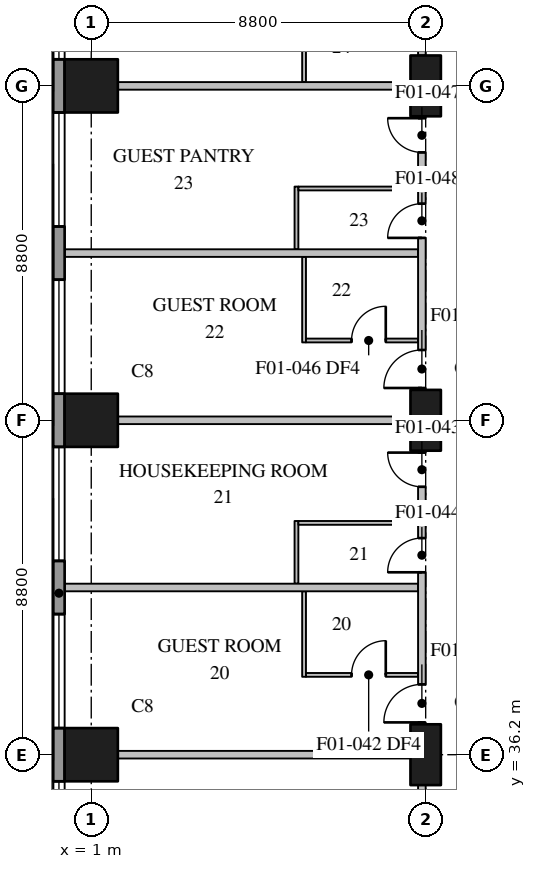
"""IFC4 building model, lengths in metres.
Left out: names, types, materials, properties, quantities, classifications, styles, units other than length and angle.
Written with IfcOpenShell. Run it as: python <this file> out.ifc"""

import sys

from ifc_helpers import new_model, si_unit, direction, frame, frame_2d, origin, origin_2d, place, context, subcontext, project, spatial, rectangle, extrude, element, fill, save


model = new_model("IFC4")
c1 = context("Model", 3, precision=1e-05, world=origin(), true_north=direction((0.0, 1.0)))
c2 = subcontext(c1, "Body", "Model", "MODEL_VIEW")
j1 = project(units=[si_unit("LENGTHUNIT", "METRE"), si_unit("PLANEANGLEUNIT", "RADIAN")], contexts=[c1])
p1 = place(None, origin())
s1 = spatial("IfcSite", under=j1, at=p1, CompositionType="ELEMENT")
p2 = place(p1, origin())
s2 = spatial("IfcBuilding", under=s1, at=p2, CompositionType="ELEMENT")
p3 = place(p2, frame((0.0, 0.0, 34.0)))
s3 = spatial("IfcBuildingStorey", under=s2, at=p3, CompositionType="ELEMENT", Elevation=34.0)
for number, where, z_axis, x_axis in (
    (1, (1.0, 36.2, 0.0), (0.0, 0.0, 1.0), (1.0, 0.0, 0.0)),
    (2, (1.0, 45.0, 0.0), (0.0, 0.0, 1.0), (1.0, 0.0, 0.0)),
    (3, (1.0, 53.8, 0.0), (0.0, 0.0, 1.0), (1.0, 0.0, 0.0)),
):
    element("IfcColumn", number, at=place(p3, frame(where, z_axis=z_axis, x_axis=x_axis)), inside=s3, PredefinedType="COLUMN", context=c2, shape_type="SweptSolid", body=[
        extrude(rectangle(XDim=1.4, YDim=1.4, at=origin_2d()), origin(), (0.0, 0.0, 1.0), 3.7),
    ])
for number, where, z_axis, x_axis in (
    (4, (9.8, 36.2, 0.0), (0.0, 0.0, 1.0), (0.0, 1.0, 0.0)),
    (5, (9.8, 45.0, 0.0), (0.0, 0.0, 1.0), (0.0, 1.0, 0.0)),
    (6, (9.8, 53.8, 0.0), (0.0, 0.0, 1.0), (0.0, 1.0, 0.0)),
):
    element("IfcColumn", number, at=place(p3, frame(where, z_axis=z_axis, x_axis=x_axis)), inside=s3, PredefinedType="COLUMN", context=c2, shape_type="SweptSolid", body=[
        extrude(rectangle(XDim=1.6, YDim=0.8, at=origin_2d()), origin(), (0.0, 0.0, 1.0), 3.7),
    ])
p4 = place(p3, frame((0.15, 78.7, 0.0), z_axis=(0.0, 0.0, 1.0), x_axis=(0.0, -1.0, 0.0)))
e7 = element("IfcWall", 7, at=p4, inside=s3, PredefinedType="STANDARD", context=c2, shape_type="SweptSolid", body=[
    extrude(rectangle(XDim=76.5, YDim=0.3, at=frame_2d((38.25, 0.0))), origin(), (0.0, 0.0, 1.0), 3.4),
])
p5 = place(p4, frame((3.6, 0.0, 0.75)))
e8 = element("IfcOpeningElement", 8, at=p5, cuts=e7, PredefinedType="OPENING", context=c2, shape_type="SweptSolid", body=[
    extrude(rectangle(XDim=3.0, YDim=2.3, at=frame_2d((1.5, 1.15))), frame((0.0, 0.16, 0.0), z_axis=(0.0, -1.0, 0.0), x_axis=(1.0, 0.0, 0.0)), (0.0, 0.0, 1.0), 0.32),
])
p6 = place(p4, frame((8.0, 0.0, 0.75)))
e9 = element("IfcOpeningElement", 9, at=p6, cuts=e7, PredefinedType="OPENING", context=c2, shape_type="SweptSolid", body=[
    extrude(rectangle(XDim=3.0, YDim=2.3, at=frame_2d((1.5, 1.15))), frame((0.0, 0.16, 0.0), z_axis=(0.0, -1.0, 0.0), x_axis=(1.0, 0.0, 0.0)), (0.0, 0.0, 1.0), 0.32),
])
p7 = place(p4, frame((12.4, 0.0, 0.75)))
e10 = element("IfcOpeningElement", 10, at=p7, cuts=e7, PredefinedType="OPENING", context=c2, shape_type="SweptSolid", body=[
    extrude(rectangle(XDim=3.0, YDim=2.3, at=frame_2d((1.5, 1.15))), frame((0.0, 0.16, 0.0), z_axis=(0.0, -1.0, 0.0), x_axis=(1.0, 0.0, 0.0)), (0.0, 0.0, 1.0), 0.32),
])
p8 = place(p4, frame((16.8, 0.0, 0.75)))
e11 = element("IfcOpeningElement", 11, at=p8, cuts=e7, PredefinedType="OPENING", context=c2, shape_type="SweptSolid", body=[
    extrude(rectangle(XDim=3.0, YDim=2.3, at=frame_2d((1.5, 1.15))), frame((0.0, 0.16, 0.0), z_axis=(0.0, -1.0, 0.0), x_axis=(1.0, 0.0, 0.0)), (0.0, 0.0, 1.0), 0.32),
])
p9 = place(p4, frame((21.2, 0.0, 0.75)))
e12 = element("IfcOpeningElement", 12, at=p9, cuts=e7, PredefinedType="OPENING", context=c2, shape_type="SweptSolid", body=[
    extrude(rectangle(XDim=3.0, YDim=2.3, at=frame_2d((1.5, 1.15))), frame((0.0, 0.16, 0.0), z_axis=(0.0, -1.0, 0.0), x_axis=(1.0, 0.0, 0.0)), (0.0, 0.0, 1.0), 0.32),
])
p10 = place(p4, frame((25.6, 0.0, 0.75)))
e13 = element("IfcOpeningElement", 13, at=p10, cuts=e7, PredefinedType="OPENING", context=c2, shape_type="SweptSolid", body=[
    extrude(rectangle(XDim=3.0, YDim=2.3, at=frame_2d((1.5, 1.15))), frame((0.0, 0.16, 0.0), z_axis=(0.0, -1.0, 0.0), x_axis=(1.0, 0.0, 0.0)), (0.0, 0.0, 1.0), 0.32),
])
p11 = place(p4, frame((30.0, 0.0, 0.75)))
e14 = element("IfcOpeningElement", 14, at=p11, cuts=e7, PredefinedType="OPENING", context=c2, shape_type="SweptSolid", body=[
    extrude(rectangle(XDim=3.0, YDim=2.3, at=frame_2d((1.5, 1.15))), frame((0.0, 0.16, 0.0), z_axis=(0.0, -1.0, 0.0), x_axis=(1.0, 0.0, 0.0)), (0.0, 0.0, 1.0), 0.32),
])
p12 = place(p4, frame((34.4, 0.0, 0.75)))
e15 = element("IfcOpeningElement", 15, at=p12, cuts=e7, PredefinedType="OPENING", context=c2, shape_type="SweptSolid", body=[
    extrude(rectangle(XDim=3.0, YDim=2.3, at=frame_2d((1.5, 1.15))), frame((0.0, 0.16, 0.0), z_axis=(0.0, -1.0, 0.0), x_axis=(1.0, 0.0, 0.0)), (0.0, 0.0, 1.0), 0.32),
])
p13 = place(p4, frame((38.8, 0.0, 0.75)))
e16 = element("IfcOpeningElement", 16, at=p13, cuts=e7, PredefinedType="OPENING", context=c2, shape_type="SweptSolid", body=[
    extrude(rectangle(XDim=3.0, YDim=2.3, at=frame_2d((1.5, 1.15))), frame((0.0, 0.16, 0.0), z_axis=(0.0, -1.0, 0.0), x_axis=(1.0, 0.0, 0.0)), (0.0, 0.0, 1.0), 0.32),
])
p14 = place(p4, frame((43.2, 0.0, 0.75)))
e17 = element("IfcOpeningElement", 17, at=p14, cuts=e7, PredefinedType="OPENING", context=c2, shape_type="SweptSolid", body=[
    extrude(rectangle(XDim=3.0, YDim=2.3, at=frame_2d((1.5, 1.15))), frame((0.0, 0.16, 0.0), z_axis=(0.0, -1.0, 0.0), x_axis=(1.0, 0.0, 0.0)), (0.0, 0.0, 1.0), 0.32),
])
p15 = place(p4, frame((47.6, 0.0, 0.75)))
e18 = element("IfcOpeningElement", 18, at=p15, cuts=e7, PredefinedType="OPENING", context=c2, shape_type="SweptSolid", body=[
    extrude(rectangle(XDim=3.0, YDim=2.3, at=frame_2d((1.5, 1.15))), frame((0.0, 0.16, 0.0), z_axis=(0.0, -1.0, 0.0), x_axis=(1.0, 0.0, 0.0)), (0.0, 0.0, 1.0), 0.32),
])
p16 = place(p4, frame((52.0, 0.0, 0.75)))
e19 = element("IfcOpeningElement", 19, at=p16, cuts=e7, PredefinedType="OPENING", context=c2, shape_type="SweptSolid", body=[
    extrude(rectangle(XDim=3.0, YDim=2.3, at=frame_2d((1.5, 1.15))), frame((0.0, 0.16, 0.0), z_axis=(0.0, -1.0, 0.0), x_axis=(1.0, 0.0, 0.0)), (0.0, 0.0, 1.0), 0.32),
])
p17 = place(p4, frame((56.4, 0.0, 0.75)))
e20 = element("IfcOpeningElement", 20, at=p17, cuts=e7, PredefinedType="OPENING", context=c2, shape_type="SweptSolid", body=[
    extrude(rectangle(XDim=3.0, YDim=2.3, at=frame_2d((1.5, 1.15))), frame((0.0, 0.16, 0.0), z_axis=(0.0, -1.0, 0.0), x_axis=(1.0, 0.0, 0.0)), (0.0, 0.0, 1.0), 0.32),
])
p18 = place(p4, frame((60.8, 0.0, 0.75)))
e21 = element("IfcOpeningElement", 21, at=p18, cuts=e7, PredefinedType="OPENING", context=c2, shape_type="SweptSolid", body=[
    extrude(rectangle(XDim=3.0, YDim=2.3, at=frame_2d((1.5, 1.15))), frame((0.0, 0.16, 0.0), z_axis=(0.0, -1.0, 0.0), x_axis=(1.0, 0.0, 0.0)), (0.0, 0.0, 1.0), 0.32),
])
p19 = place(p4, frame((65.2, 0.0, 0.75)))
e22 = element("IfcOpeningElement", 22, at=p19, cuts=e7, PredefinedType="OPENING", context=c2, shape_type="SweptSolid", body=[
    extrude(rectangle(XDim=3.0, YDim=2.3, at=frame_2d((1.5, 1.15))), frame((0.0, 0.16, 0.0), z_axis=(0.0, -1.0, 0.0), x_axis=(1.0, 0.0, 0.0)), (0.0, 0.0, 1.0), 0.32),
])
p20 = place(p4, frame((69.6, 0.0, 0.75)))
e23 = element("IfcOpeningElement", 23, at=p20, cuts=e7, PredefinedType="OPENING", context=c2, shape_type="SweptSolid", body=[
    extrude(rectangle(XDim=3.0, YDim=2.3, at=frame_2d((1.5, 1.15))), frame((0.0, 0.16, 0.0), z_axis=(0.0, -1.0, 0.0), x_axis=(1.0, 0.0, 0.0)), (0.0, 0.0, 1.0), 0.32),
])
p21 = place(p3, frame((9.7, 28.2, 0.0), z_axis=(0.0, 0.0, 1.0), x_axis=(0.0, 1.0, 0.0)))
e24 = element("IfcWall", 24, at=p21, inside=s3, PredefinedType="PARTITIONING", context=c2, shape_type="SweptSolid", body=[
    extrude(rectangle(XDim=7.2, YDim=0.2, at=frame_2d((3.6, 0.0))), origin(), (0.0, 0.0, 1.0), 3.4),
])
p22 = place(p21, frame((3.05, 0.0, 0.0)))
e25 = element("IfcOpeningElement", 25, at=p22, cuts=e24, PredefinedType="OPENING", context=c2, shape_type="SweptSolid", body=[
    extrude(rectangle(XDim=1.1, YDim=2.1, at=frame_2d((0.55, 1.05))), frame((0.0, 0.11, 0.0), z_axis=(0.0, -1.0, 0.0), x_axis=(1.0, 0.0, 0.0)), (0.0, 0.0, 1.0), 0.22),
])
p23 = place(p3, frame((9.7, 37.0, 0.0), z_axis=(0.0, 0.0, 1.0), x_axis=(0.0, 1.0, 0.0)))
e26 = element("IfcWall", 26, at=p23, inside=s3, PredefinedType="PARTITIONING", context=c2, shape_type="SweptSolid", body=[
    extrude(rectangle(XDim=7.2, YDim=0.2, at=frame_2d((3.6, 0.0))), origin(), (0.0, 0.0, 1.0), 3.4),
])
p24 = place(p23, frame((0.05, 0.0, 0.0)))
e27 = element("IfcOpeningElement", 27, at=p24, cuts=e26, PredefinedType="OPENING", context=c2, shape_type="SweptSolid", body=[
    extrude(rectangle(XDim=1.0, YDim=2.1, at=frame_2d((0.5, 1.05))), frame((0.0, 0.11, 0.0), z_axis=(0.0, -1.0, 0.0), x_axis=(1.0, 0.0, 0.0)), (0.0, 0.0, 1.0), 0.22),
])
p25 = place(p23, frame((6.25, 0.0, 0.0)))
e28 = element("IfcOpeningElement", 28, at=p25, cuts=e26, PredefinedType="OPENING", context=c2, shape_type="SweptSolid", body=[
    extrude(rectangle(XDim=0.9, YDim=2.1, at=frame_2d((0.45, 1.05))), frame((0.0, 0.11, 0.0), z_axis=(0.0, -1.0, 0.0), x_axis=(1.0, 0.0, 0.0)), (0.0, 0.0, 1.0), 0.22),
])
p26 = place(p23, frame((4.0, 0.0, 0.0)))
e29 = element("IfcOpeningElement", 29, at=p26, cuts=e26, PredefinedType="OPENING", context=c2, shape_type="SweptSolid", body=[
    extrude(rectangle(XDim=0.9, YDim=2.1, at=frame_2d((0.45, 1.05))), frame((0.0, 0.11, 0.0), z_axis=(0.0, -1.0, 0.0), x_axis=(1.0, 0.0, 0.0)), (0.0, 0.0, 1.0), 0.22),
])
p27 = place(p3, frame((9.7, 45.8, 0.0), z_axis=(0.0, 0.0, 1.0), x_axis=(0.0, 1.0, 0.0)))
e30 = element("IfcWall", 30, at=p27, inside=s3, PredefinedType="PARTITIONING", context=c2, shape_type="SweptSolid", body=[
    extrude(rectangle(XDim=7.2, YDim=0.2, at=frame_2d((3.6, 0.0))), origin(), (0.0, 0.0, 1.0), 3.4),
])
p28 = place(p27, frame((0.05, 0.0, 0.0)))
e31 = element("IfcOpeningElement", 31, at=p28, cuts=e30, PredefinedType="OPENING", context=c2, shape_type="SweptSolid", body=[
    extrude(rectangle(XDim=1.0, YDim=2.1, at=frame_2d((0.5, 1.05))), frame((0.0, 0.11, 0.0), z_axis=(0.0, -1.0, 0.0), x_axis=(1.0, 0.0, 0.0)), (0.0, 0.0, 1.0), 0.22),
])
p29 = place(p27, frame((6.25, 0.0, 0.0)))
e32 = element("IfcOpeningElement", 32, at=p29, cuts=e30, PredefinedType="OPENING", context=c2, shape_type="SweptSolid", body=[
    extrude(rectangle(XDim=0.9, YDim=2.1, at=frame_2d((0.45, 1.05))), frame((0.0, 0.11, 0.0), z_axis=(0.0, -1.0, 0.0), x_axis=(1.0, 0.0, 0.0)), (0.0, 0.0, 1.0), 0.22),
])
p30 = place(p27, frame((4.0, 0.0, 0.0)))
e33 = element("IfcOpeningElement", 33, at=p30, cuts=e30, PredefinedType="OPENING", context=c2, shape_type="SweptSolid", body=[
    extrude(rectangle(XDim=0.9, YDim=2.1, at=frame_2d((0.45, 1.05))), frame((0.0, 0.11, 0.0), z_axis=(0.0, -1.0, 0.0), x_axis=(1.0, 0.0, 0.0)), (0.0, 0.0, 1.0), 0.22),
])
p31 = place(p3, frame((9.7, 54.6, 0.0), z_axis=(0.0, 0.0, 1.0), x_axis=(0.0, 1.0, 0.0)))
e34 = element("IfcWall", 34, at=p31, inside=s3, PredefinedType="PARTITIONING", context=c2, shape_type="SweptSolid", body=[
    extrude(rectangle(XDim=3.2, YDim=0.2, at=frame_2d((1.6, 0.0))), origin(), (0.0, 0.0, 1.0), 3.4),
])
p32 = place(p31, frame((1.85, 0.0, 0.0)))
e35 = element("IfcOpeningElement", 35, at=p32, cuts=e34, PredefinedType="OPENING", context=c2, shape_type="SweptSolid", body=[
    extrude(rectangle(XDim=1.0, YDim=2.1, at=frame_2d((0.5, 1.05))), frame((0.0, 0.11, 0.0), z_axis=(0.0, -1.0, 0.0), x_axis=(1.0, 0.0, 0.0)), (0.0, 0.0, 1.0), 0.22),
])
p33 = place(p3, frame((1.7, 36.2, 0.0), z_axis=(0.0, 0.0, 1.0), x_axis=(1.0, 0.0, 0.0)))
e36 = element("IfcWall", 36, at=p33, inside=s3, PredefinedType="PARTITIONING", context=c2, shape_type="SweptSolid", body=[
    extrude(rectangle(XDim=7.7, YDim=0.2, at=frame_2d((3.85, 0.0))), origin(), (0.0, 0.0, 1.0), 3.4),
])
p34 = place(p3, frame((0.31, 40.6, 0.0), z_axis=(0.0, 0.0, 1.0), x_axis=(1.0, 0.0, 0.0)))
e37 = element("IfcWall", 37, at=p34, inside=s3, PredefinedType="PARTITIONING", context=c2, shape_type="SweptSolid", body=[
    extrude(rectangle(XDim=9.29, YDim=0.2, at=frame_2d((4.645, 0.0))), origin(), (0.0, 0.0, 1.0), 3.4),
])
p35 = place(p3, frame((1.7, 45.0, 0.0), z_axis=(0.0, 0.0, 1.0), x_axis=(1.0, 0.0, 0.0)))
e38 = element("IfcWall", 38, at=p35, inside=s3, PredefinedType="PARTITIONING", context=c2, shape_type="SweptSolid", body=[
    extrude(rectangle(XDim=7.7, YDim=0.2, at=frame_2d((3.85, 0.0))), origin(), (0.0, 0.0, 1.0), 3.4),
])
p36 = place(p3, frame((0.31, 49.4, 0.0), z_axis=(0.0, 0.0, 1.0), x_axis=(1.0, 0.0, 0.0)))
e39 = element("IfcWall", 39, at=p36, inside=s3, PredefinedType="PARTITIONING", context=c2, shape_type="SweptSolid", body=[
    extrude(rectangle(XDim=9.29, YDim=0.2, at=frame_2d((4.645, 0.0))), origin(), (0.0, 0.0, 1.0), 3.4),
])
p37 = place(p3, frame((1.7, 53.8, 0.0), z_axis=(0.0, 0.0, 1.0), x_axis=(1.0, 0.0, 0.0)))
e40 = element("IfcWall", 40, at=p37, inside=s3, PredefinedType="PARTITIONING", context=c2, shape_type="SweptSolid", body=[
    extrude(rectangle(XDim=7.7, YDim=0.2, at=frame_2d((3.85, 0.0))), origin(), (0.0, 0.0, 1.0), 3.4),
])
p38 = place(p3, frame((6.4, 40.7, 0.0), z_axis=(0.0, 0.0, 1.0), x_axis=(0.0, 1.0, 0.0)))
e41 = element("IfcWall", 41, at=p38, inside=s3, PredefinedType="PARTITIONING", context=c2, shape_type="SweptSolid", body=[
    extrude(rectangle(XDim=1.65, YDim=0.1, at=frame_2d((0.825, 0.0))), origin(), (0.0, 0.0, 1.0), 3.4),
])
p39 = place(p3, frame((6.4, 49.5, 0.0), z_axis=(0.0, 0.0, 1.0), x_axis=(0.0, 1.0, 0.0)))
e42 = element("IfcWall", 42, at=p39, inside=s3, PredefinedType="PARTITIONING", context=c2, shape_type="SweptSolid", body=[
    extrude(rectangle(XDim=1.65, YDim=0.1, at=frame_2d((0.825, 0.0))), origin(), (0.0, 0.0, 1.0), 3.4),
])
for number, where, z_axis, x_axis in (
    (43, (6.6, 38.25, 0.0), (0.0, 0.0, 1.0), (0.0, 1.0, 0.0)),
    (44, (6.6, 47.05, 0.0), (0.0, 0.0, 1.0), (0.0, 1.0, 0.0)),
    (45, (6.6, 53.9, 0.0), (0.0, 0.0, 1.0), (0.0, 1.0, 0.0)),
):
    element("IfcWall", number, at=place(p3, frame(where, z_axis=z_axis, x_axis=x_axis)), inside=s3, PredefinedType="PARTITIONING", context=c2, shape_type="SweptSolid", body=[
        extrude(rectangle(XDim=2.25, YDim=0.1, at=frame_2d((1.125, 0.0))), origin(), (0.0, 0.0, 1.0), 3.4),
    ])
p40 = place(p3, frame((6.65, 38.3, 0.0), z_axis=(0.0, 0.0, 1.0), x_axis=(1.0, 0.0, 0.0)))
e46 = element("IfcWall", 46, at=p40, inside=s3, PredefinedType="PARTITIONING", context=c2, shape_type="SweptSolid", body=[
    extrude(rectangle(XDim=2.95, YDim=0.1, at=frame_2d((1.475, 0.0))), origin(), (0.0, 0.0, 1.0), 3.4),
])
p41 = place(p40, frame((1.2, 0.0, 0.0)))
e47 = element("IfcOpeningElement", 47, at=p41, cuts=e46, PredefinedType="OPENING", context=c2, shape_type="SweptSolid", body=[
    extrude(rectangle(XDim=0.9, YDim=2.1, at=frame_2d((0.45, 1.05))), frame((0.0, 0.06, 0.0), z_axis=(0.0, -1.0, 0.0), x_axis=(1.0, 0.0, 0.0)), (0.0, 0.0, 1.0), 0.12),
])
p42 = place(p3, frame((6.45, 42.3, 0.0), z_axis=(0.0, 0.0, 1.0), x_axis=(1.0, 0.0, 0.0)))
e48 = element("IfcWall", 48, at=p42, inside=s3, PredefinedType="PARTITIONING", context=c2, shape_type="SweptSolid", body=[
    extrude(rectangle(XDim=3.15, YDim=0.1, at=frame_2d((1.575, 0.0))), origin(), (0.0, 0.0, 1.0), 3.4),
])
p43 = place(p3, frame((6.65, 47.1, 0.0), z_axis=(0.0, 0.0, 1.0), x_axis=(1.0, 0.0, 0.0)))
e49 = element("IfcWall", 49, at=p43, inside=s3, PredefinedType="PARTITIONING", context=c2, shape_type="SweptSolid", body=[
    extrude(rectangle(XDim=2.95, YDim=0.1, at=frame_2d((1.475, 0.0))), origin(), (0.0, 0.0, 1.0), 3.4),
])
p44 = place(p43, frame((1.2, 0.0, 0.0)))
e50 = element("IfcOpeningElement", 50, at=p44, cuts=e49, PredefinedType="OPENING", context=c2, shape_type="SweptSolid", body=[
    extrude(rectangle(XDim=0.9, YDim=2.1, at=frame_2d((0.45, 1.05))), frame((0.0, 0.06, 0.0), z_axis=(0.0, -1.0, 0.0), x_axis=(1.0, 0.0, 0.0)), (0.0, 0.0, 1.0), 0.12),
])
p45 = place(p3, frame((6.45, 51.1, 0.0), z_axis=(0.0, 0.0, 1.0), x_axis=(1.0, 0.0, 0.0)))
e51 = element("IfcWall", 51, at=p45, inside=s3, PredefinedType="PARTITIONING", context=c2, shape_type="SweptSolid", body=[
    extrude(rectangle(XDim=3.15, YDim=0.1, at=frame_2d((1.575, 0.0))), origin(), (0.0, 0.0, 1.0), 3.4),
])
p46 = place(p9, origin())
e52 = element("IfcWindow", 52, at=p46, inside=s3, PartitioningType="SINGLE_PANEL", PredefinedType="WINDOW", context=c2, shape_type="SweptSolid", body=[
    extrude(rectangle(XDim=3.0, YDim=2.3, at=frame_2d((1.5, 1.15))), frame((0.0, 0.03, 0.0), z_axis=(0.0, -1.0, 0.0), x_axis=(1.0, 0.0, 0.0)), (0.0, 0.0, 1.0), 0.06),
])
fill(e12, e52)
p47 = place(p10, origin())
e53 = element("IfcWindow", 53, at=p47, inside=s3, PartitioningType="SINGLE_PANEL", PredefinedType="WINDOW", context=c2, shape_type="SweptSolid", body=[
    extrude(rectangle(XDim=3.0, YDim=2.3, at=frame_2d((1.5, 1.15))), frame((0.0, 0.03, 0.0), z_axis=(0.0, -1.0, 0.0), x_axis=(1.0, 0.0, 0.0)), (0.0, 0.0, 1.0), 0.06),
])
fill(e13, e53)
p48 = place(p11, origin())
e54 = element("IfcWindow", 54, at=p48, inside=s3, PartitioningType="SINGLE_PANEL", PredefinedType="WINDOW", context=c2, shape_type="SweptSolid", body=[
    extrude(rectangle(XDim=3.0, YDim=2.3, at=frame_2d((1.5, 1.15))), frame((0.0, 0.03, 0.0), z_axis=(0.0, -1.0, 0.0), x_axis=(1.0, 0.0, 0.0)), (0.0, 0.0, 1.0), 0.06),
])
fill(e14, e54)
p49 = place(p12, origin())
e55 = element("IfcWindow", 55, at=p49, inside=s3, PartitioningType="SINGLE_PANEL", PredefinedType="WINDOW", context=c2, shape_type="SweptSolid", body=[
    extrude(rectangle(XDim=3.0, YDim=2.3, at=frame_2d((1.5, 1.15))), frame((0.0, 0.03, 0.0), z_axis=(0.0, -1.0, 0.0), x_axis=(1.0, 0.0, 0.0)), (0.0, 0.0, 1.0), 0.06),
])
fill(e15, e55)
p50 = place(p13, origin())
e56 = element("IfcWindow", 56, at=p50, inside=s3, PartitioningType="SINGLE_PANEL", PredefinedType="WINDOW", context=c2, shape_type="SweptSolid", body=[
    extrude(rectangle(XDim=3.0, YDim=2.3, at=frame_2d((1.5, 1.15))), frame((0.0, 0.03, 0.0), z_axis=(0.0, -1.0, 0.0), x_axis=(1.0, 0.0, 0.0)), (0.0, 0.0, 1.0), 0.06),
])
fill(e16, e56)
p51 = place(p14, origin())
e57 = element("IfcWindow", 57, at=p51, inside=s3, PartitioningType="SINGLE_PANEL", PredefinedType="WINDOW", context=c2, shape_type="SweptSolid", body=[
    extrude(rectangle(XDim=3.0, YDim=2.3, at=frame_2d((1.5, 1.15))), frame((0.0, 0.03, 0.0), z_axis=(0.0, -1.0, 0.0), x_axis=(1.0, 0.0, 0.0)), (0.0, 0.0, 1.0), 0.06),
])
fill(e17, e57)
p52 = place(p24, origin())
e58 = element("IfcDoor", 58, at=p52, inside=s3, OperationType="SINGLE_SWING_LEFT", PredefinedType="DOOR", context=c2, shape_type="SweptSolid", body=[
    extrude(rectangle(XDim=1.0, YDim=2.1, at=frame_2d((0.5, 1.05))), frame((0.0, 0.025, 0.0), z_axis=(0.0, -1.0, 0.0), x_axis=(1.0, 0.0, 0.0)), (0.0, 0.0, 1.0), 0.05),
])
fill(e27, e58)
p53 = place(p41, origin())
e59 = element("IfcDoor", 59, at=p53, inside=s3, OperationType="SINGLE_SWING_RIGHT", PredefinedType="DOOR", context=c2, shape_type="SweptSolid", body=[
    extrude(rectangle(XDim=0.9, YDim=2.1, at=frame_2d((0.45, 1.05))), frame((0.0, 0.025, 0.0), z_axis=(0.0, -1.0, 0.0), x_axis=(1.0, 0.0, 0.0)), (0.0, 0.0, 1.0), 0.05),
])
fill(e47, e59)
p54 = place(p25, origin())
e60 = element("IfcDoor", 60, at=p54, inside=s3, OperationType="SINGLE_SWING_RIGHT", PredefinedType="DOOR", context=c2, shape_type="SweptSolid", body=[
    extrude(rectangle(XDim=0.9, YDim=2.1, at=frame_2d((0.45, 1.05))), frame((0.0, 0.025, 0.0), z_axis=(0.0, -1.0, 0.0), x_axis=(1.0, 0.0, 0.0)), (0.0, 0.0, 1.0), 0.05),
])
fill(e28, e60)
p55 = place(p26, origin())
e61 = element("IfcDoor", 61, at=p55, inside=s3, OperationType="SINGLE_SWING_LEFT", PredefinedType="DOOR", context=c2, shape_type="SweptSolid", body=[
    extrude(rectangle(XDim=0.9, YDim=2.1, at=frame_2d((0.45, 1.05))), frame((0.0, 0.025, 0.0), z_axis=(0.0, -1.0, 0.0), x_axis=(1.0, 0.0, 0.0)), (0.0, 0.0, 1.0), 0.05),
])
fill(e29, e61)
p56 = place(p28, origin())
e62 = element("IfcDoor", 62, at=p56, inside=s3, OperationType="SINGLE_SWING_LEFT", PredefinedType="DOOR", context=c2, shape_type="SweptSolid", body=[
    extrude(rectangle(XDim=1.0, YDim=2.1, at=frame_2d((0.5, 1.05))), frame((0.0, 0.025, 0.0), z_axis=(0.0, -1.0, 0.0), x_axis=(1.0, 0.0, 0.0)), (0.0, 0.0, 1.0), 0.05),
])
fill(e31, e62)
p57 = place(p44, origin())
e63 = element("IfcDoor", 63, at=p57, inside=s3, OperationType="SINGLE_SWING_RIGHT", PredefinedType="DOOR", context=c2, shape_type="SweptSolid", body=[
    extrude(rectangle(XDim=0.9, YDim=2.1, at=frame_2d((0.45, 1.05))), frame((0.0, 0.025, 0.0), z_axis=(0.0, -1.0, 0.0), x_axis=(1.0, 0.0, 0.0)), (0.0, 0.0, 1.0), 0.05),
])
fill(e50, e63)
p58 = place(p29, origin())
e64 = element("IfcDoor", 64, at=p58, inside=s3, OperationType="SINGLE_SWING_RIGHT", PredefinedType="DOOR", context=c2, shape_type="SweptSolid", body=[
    extrude(rectangle(XDim=0.9, YDim=2.1, at=frame_2d((0.45, 1.05))), frame((0.0, 0.025, 0.0), z_axis=(0.0, -1.0, 0.0), x_axis=(1.0, 0.0, 0.0)), (0.0, 0.0, 1.0), 0.05),
])
fill(e32, e64)
p59 = place(p30, origin())
e65 = element("IfcDoor", 65, at=p59, inside=s3, OperationType="SINGLE_SWING_LEFT", PredefinedType="DOOR", context=c2, shape_type="SweptSolid", body=[
    extrude(rectangle(XDim=0.9, YDim=2.1, at=frame_2d((0.45, 1.05))), frame((0.0, 0.025, 0.0), z_axis=(0.0, -1.0, 0.0), x_axis=(1.0, 0.0, 0.0)), (0.0, 0.0, 1.0), 0.05),
])
fill(e33, e65)
save(model, sys.argv[1])
